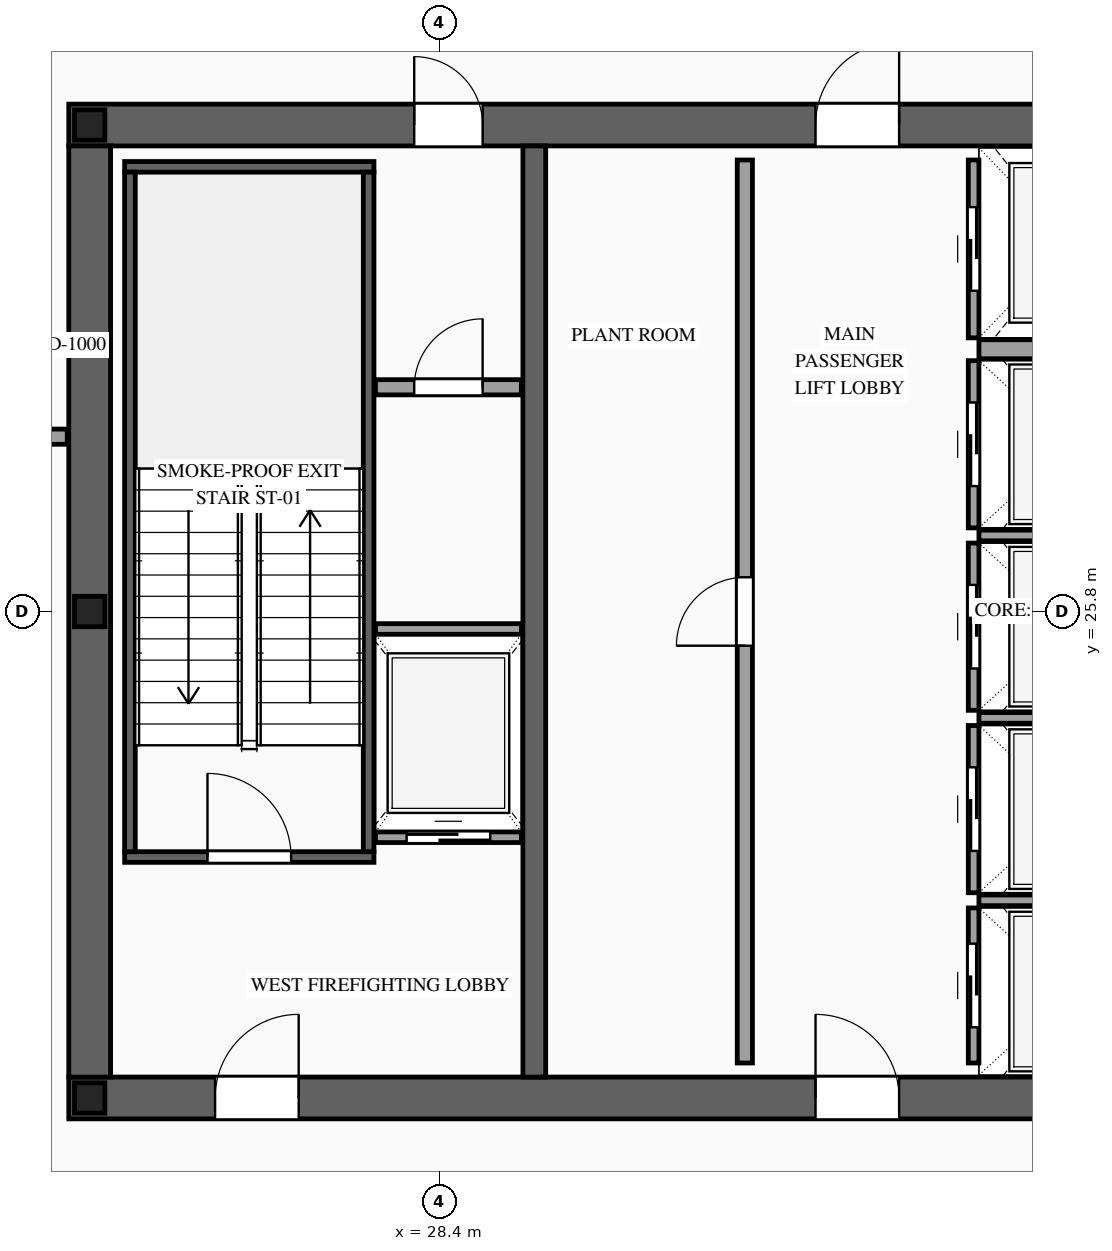
"""IFC4 building model, lengths in metres.
Left out: names, types, materials, properties, quantities, classifications, styles, units other than length and angle.
Written with IfcOpenShell. Run it as: python <this file> out.ifc"""

import sys

from ifc_helpers import new_model, si_unit, direction, frame, frame_2d, origin, origin_2d, place, context, subcontext, project, spatial, rectangle, i_section, extrude, source, transform, mapped, element, fill, save


model = new_model("IFC4")
c1 = context("Model", 3, precision=1e-05, world=origin(), true_north=direction((0.0, 1.0)))
c2 = subcontext(c1, "Body", "Model", "MODEL_VIEW")
j1 = project(units=[si_unit("LENGTHUNIT", "METRE"), si_unit("PLANEANGLEUNIT", "RADIAN")], contexts=[c1])
p1 = place(None, origin())
s1 = spatial("IfcSite", under=j1, at=p1, CompositionType="ELEMENT")
p2 = place(p1, origin())
s2 = spatial("IfcBuilding", under=s1, at=p2, CompositionType="ELEMENT")
p3 = place(p2, frame((0.0, 0.0, 219.5)))
s3 = spatial("IfcBuildingStorey", under=s2, at=p3, CompositionType="ELEMENT", Elevation=219.5)
p4 = place(p3, frame((23.525, 19.4, 0.0), z_axis=(0.0, 0.0, 1.0), x_axis=(1.0, 0.0, 0.0)))
e1 = element("IfcWall", 1, at=p4, inside=s3, PredefinedType="SHEAR", context=c2, shape_type="SweptSolid", body=[
    extrude(rectangle(XDim=26.95, YDim=0.55, at=frame_2d((13.475, 0.0))), origin(), (0.0, 0.0, 1.0), 4.6),
])
p5 = place(p4, frame((1.925, 0.0, 0.0)))
e2 = element("IfcOpeningElement", 2, at=p5, cuts=e1, PredefinedType="OPENING", context=c2, shape_type="SweptSolid", body=[
    extrude(rectangle(XDim=1.1, YDim=2.2, at=frame_2d((0.55, 1.1))), frame((0.0, 0.29, 0.0), z_axis=(0.0, -1.0, 0.0), x_axis=(1.0, 0.0, 0.0)), (0.0, 0.0, 1.0), 0.58),
])
p6 = place(p4, frame((9.825, 0.0, 0.0)))
e3 = element("IfcOpeningElement", 3, at=p6, cuts=e1, PredefinedType="OPENING", context=c2, shape_type="SweptSolid", body=[
    extrude(rectangle(XDim=1.1, YDim=2.2, at=frame_2d((0.55, 1.1))), frame((0.0, 0.29, 0.0), z_axis=(0.0, -1.0, 0.0), x_axis=(1.0, 0.0, 0.0)), (0.0, 0.0, 1.0), 0.58),
])
p7 = place(p4, frame((23.025, 0.0, 0.0)))
e4 = element("IfcOpeningElement", 4, at=p7, cuts=e1, PredefinedType="OPENING", context=c2, shape_type="SweptSolid", body=[
    extrude(rectangle(XDim=1.1, YDim=2.2, at=frame_2d((0.55, 1.1))), frame((0.0, 0.29, 0.0), z_axis=(0.0, -1.0, 0.0), x_axis=(1.0, 0.0, 0.0)), (0.0, 0.0, 1.0), 0.58),
])
p8 = place(p4, frame((19.645, 0.0, 0.0)))
e5 = element("IfcOpeningElement", 5, at=p8, cuts=e1, PredefinedType="OPENING", context=c2, shape_type="SweptSolid", body=[
    extrude(rectangle(XDim=0.9, YDim=2.15, at=frame_2d((0.45, 1.075))), frame((0.0, 0.29, 0.0), z_axis=(0.0, -1.0, 0.0), x_axis=(1.0, 0.0, 0.0)), (0.0, 0.0, 1.0), 0.58),
])
p9 = place(p3, frame((23.525, 32.2, 0.0), z_axis=(0.0, 0.0, 1.0), x_axis=(1.0, 0.0, 0.0)))
e6 = element("IfcWall", 6, at=p9, inside=s3, PredefinedType="SHEAR", context=c2, shape_type="SweptSolid", body=[
    extrude(rectangle(XDim=26.95, YDim=0.55, at=frame_2d((13.475, 0.0))), origin(), (0.0, 0.0, 1.0), 4.6),
])
p10 = place(p9, frame((4.545, 0.0, 0.0)))
e7 = element("IfcOpeningElement", 7, at=p10, cuts=e6, PredefinedType="OPENING", context=c2, shape_type="SweptSolid", body=[
    extrude(rectangle(XDim=0.9, YDim=2.15, at=frame_2d((0.45, 1.075))), frame((0.0, 0.29, 0.0), z_axis=(0.0, -1.0, 0.0), x_axis=(1.0, 0.0, 0.0)), (0.0, 0.0, 1.0), 0.58),
])
p11 = place(p9, frame((9.825, 0.0, 0.0)))
e8 = element("IfcOpeningElement", 8, at=p11, cuts=e6, PredefinedType="OPENING", context=c2, shape_type="SweptSolid", body=[
    extrude(rectangle(XDim=1.1, YDim=2.2, at=frame_2d((0.55, 1.1))), frame((0.0, 0.29, 0.0), z_axis=(0.0, -1.0, 0.0), x_axis=(1.0, 0.0, 0.0)), (0.0, 0.0, 1.0), 0.58),
])
p12 = place(p9, frame((15.675, 0.0, 0.0)))
e9 = element("IfcOpeningElement", 9, at=p12, cuts=e6, PredefinedType="OPENING", context=c2, shape_type="SweptSolid", body=[
    extrude(rectangle(XDim=1.1, YDim=2.2, at=frame_2d((0.55, 1.1))), frame((0.0, 0.29, 0.0), z_axis=(0.0, -1.0, 0.0), x_axis=(1.0, 0.0, 0.0)), (0.0, 0.0, 1.0), 0.58),
])
p13 = place(p9, frame((18.875, 0.0, 0.0)))
e10 = element("IfcOpeningElement", 10, at=p13, cuts=e6, PredefinedType="OPENING", context=c2, shape_type="SweptSolid", body=[
    extrude(rectangle(XDim=0.9, YDim=2.15, at=frame_2d((0.45, 1.075))), frame((0.0, 0.29, 0.0), z_axis=(0.0, -1.0, 0.0), x_axis=(1.0, 0.0, 0.0)), (0.0, 0.0, 1.0), 0.58),
])
m1 = source(origin(), c2, "Body", "SweptSolid", [
    extrude(rectangle(XDim=12.25, YDim=0.55, at=frame_2d((6.125, 0.0))), origin(), (0.0, 0.0, 1.0), 4.6),
])
p14 = place(p3, frame((23.8, 19.675, 0.0), z_axis=(0.0, 0.0, 1.0), x_axis=(0.0, 1.0, 0.0)))
e11 = element("IfcWall", 11, at=p14, inside=s3, PredefinedType="SHEAR", context=c2, shape_type="MappedRepresentation", body=[
    mapped(m1, transform((0.0, 0.0, 0.0), scale=1.0)),
])
m2 = source(origin(), c2, "Body", "SweptSolid", [
    extrude(rectangle(XDim=12.25, YDim=0.3, at=frame_2d((6.125, 0.0))), origin(), (0.0, 0.0, 1.0), 4.6),
])
p15 = place(p3, frame((29.65, 19.675, 0.0), z_axis=(0.0, 0.0, 1.0), x_axis=(0.0, 1.0, 0.0)))
e12 = element("IfcWall", 12, at=p15, inside=s3, PredefinedType="SOLIDWALL", context=c2, shape_type="MappedRepresentation", body=[
    mapped(m2, transform((0.0, 0.0, 0.0), scale=1.0)),
])
m3 = source(origin(), c2, "Body", "SweptSolid", [
    extrude(i_section(OverallWidth=0.4, OverallDepth=0.4, WebThickness=0.013, FlangeThickness=0.021, at=origin_2d()), origin(), (0.0, 0.0, 1.0), 4.6),
])
for number, where, z_axis, x_axis in (
    (13, (23.8, 19.4, 0.0), (0.0, 0.0, 1.0), (1.0, 0.0, 0.0)),
    (14, (23.8, 25.8, 0.0), (0.0, 0.0, 1.0), (1.0, 0.0, 0.0)),
    (15, (23.8, 32.2, 0.0), (0.0, 0.0, 1.0), (1.0, 0.0, 0.0)),
):
    element("IfcColumn", number, at=place(p3, frame(where, z_axis=z_axis, x_axis=x_axis)), inside=s3, PredefinedType="COLUMN", context=c2, shape_type="MappedRepresentation", body=[
        mapped(m3, transform((0.0, 0.0, 0.0), scale=1.0)),
    ])
p16 = place(p3, frame((27.56, 22.83, 0.0), z_axis=(0.0, 0.0, 1.0), x_axis=(1.0, 0.0, 0.0)))
e16 = element("IfcWall", 16, at=p16, inside=s3, PredefinedType="SOLIDWALL", context=c2, shape_type="SweptSolid", body=[
    extrude(rectangle(XDim=1.92, YDim=0.14, at=frame_2d((0.96, 0.0))), origin(), (0.0, 0.0, 1.0), 4.38),
])
p17 = place(p16, frame((0.41, 0.0, 0.0)))
e17 = element("IfcOpeningElement", 17, at=p17, cuts=e16, PredefinedType="OPENING", context=c2, shape_type="SweptSolid", body=[
    extrude(rectangle(XDim=1.1, YDim=2.2, at=frame_2d((0.55, 1.1))), frame((0.0, 0.085, 0.0), z_axis=(0.0, -1.0, 0.0), x_axis=(1.0, 0.0, 0.0)), (0.0, 0.0, 1.0), 0.17),
])
m4 = source(origin(), c2, "Body", "SweptSolid", [
    extrude(rectangle(XDim=1.92, YDim=0.14, at=frame_2d((0.96, 0.0))), origin(), (0.0, 0.0, 1.0), 4.38),
])
p18 = place(p3, frame((27.56, 25.57, 0.0), z_axis=(0.0, 0.0, 1.0), x_axis=(1.0, 0.0, 0.0)))
e18 = element("IfcWall", 18, at=p18, inside=s3, PredefinedType="SOLIDWALL", context=c2, shape_type="MappedRepresentation", body=[
    mapped(m4, transform((0.0, 0.0, 0.0), scale=1.0)),
])
p19 = place(p3, frame((35.43, 19.86, 0.0), z_axis=(0.0, 0.0, 1.0), x_axis=(0.0, 1.0, 0.0)))
e19 = element("IfcWall", 19, at=p19, inside=s3, PredefinedType="SOLIDWALL", context=c2, shape_type="SweptSolid", body=[
    extrude(rectangle(XDim=2.04, YDim=0.14, at=frame_2d((1.02, 0.0))), origin(), (0.0, 0.0, 1.0), 4.38),
])
p20 = place(p19, frame((0.47, 0.0, 0.0)))
e20 = element("IfcOpeningElement", 20, at=p20, cuts=e19, PredefinedType="OPENING", context=c2, shape_type="SweptSolid", body=[
    extrude(rectangle(XDim=1.1, YDim=2.2, at=frame_2d((0.55, 1.1))), frame((0.0, 0.085, 0.0), z_axis=(0.0, -1.0, 0.0), x_axis=(1.0, 0.0, 0.0)), (0.0, 0.0, 1.0), 0.17),
])
m5 = source(origin(), c2, "Body", "SweptSolid", [
    extrude(rectangle(XDim=2.4, YDim=0.14, at=frame_2d((1.2, 0.0))), origin(), (0.0, 0.0, 1.0), 4.38),
])
p21 = place(p3, frame((35.5, 22.0, 0.0), z_axis=(0.0, 0.0, 1.0), x_axis=(1.0, 0.0, 0.0)))
e21 = element("IfcWall", 21, at=p21, inside=s3, PredefinedType="SOLIDWALL", context=c2, shape_type="MappedRepresentation", body=[
    mapped(m5, transform((0.0, 0.0, 0.0), scale=1.0)),
])
p22 = place(p3, frame((35.43, 22.1, 0.0), z_axis=(0.0, 0.0, 1.0), x_axis=(0.0, 1.0, 0.0)))
e22 = element("IfcWall", 22, at=p22, inside=s3, PredefinedType="SOLIDWALL", context=c2, shape_type="SweptSolid", body=[
    extrude(rectangle(XDim=2.2, YDim=0.14, at=frame_2d((1.1, 0.0))), origin(), (0.0, 0.0, 1.0), 4.38),
])
p23 = place(p22, frame((0.55, 0.0, 0.0)))
e23 = element("IfcOpeningElement", 23, at=p23, cuts=e22, PredefinedType="OPENING", context=c2, shape_type="SweptSolid", body=[
    extrude(rectangle(XDim=1.1, YDim=2.2, at=frame_2d((0.55, 1.1))), frame((0.0, 0.085, 0.0), z_axis=(0.0, -1.0, 0.0), x_axis=(1.0, 0.0, 0.0)), (0.0, 0.0, 1.0), 0.17),
])
p24 = place(p3, frame((35.5, 24.4, 0.0), z_axis=(0.0, 0.0, 1.0), x_axis=(1.0, 0.0, 0.0)))
e24 = element("IfcWall", 24, at=p24, inside=s3, PredefinedType="SOLIDWALL", context=c2, shape_type="MappedRepresentation", body=[
    mapped(m5, transform((0.0, 0.0, 0.0), scale=1.0)),
])
p25 = place(p3, frame((35.43, 24.5, 0.0), z_axis=(0.0, 0.0, 1.0), x_axis=(0.0, 1.0, 0.0)))
e25 = element("IfcWall", 25, at=p25, inside=s3, PredefinedType="SOLIDWALL", context=c2, shape_type="SweptSolid", body=[
    extrude(rectangle(XDim=2.2, YDim=0.14, at=frame_2d((1.1, 0.0))), origin(), (0.0, 0.0, 1.0), 4.38),
])
p26 = place(p25, frame((0.55, 0.0, 0.0)))
e26 = element("IfcOpeningElement", 26, at=p26, cuts=e25, PredefinedType="OPENING", context=c2, shape_type="SweptSolid", body=[
    extrude(rectangle(XDim=1.1, YDim=2.2, at=frame_2d((0.55, 1.1))), frame((0.0, 0.085, 0.0), z_axis=(0.0, -1.0, 0.0), x_axis=(1.0, 0.0, 0.0)), (0.0, 0.0, 1.0), 0.17),
])
p27 = place(p3, frame((35.5, 26.8, 0.0), z_axis=(0.0, 0.0, 1.0), x_axis=(1.0, 0.0, 0.0)))
e27 = element("IfcWall", 27, at=p27, inside=s3, PredefinedType="SOLIDWALL", context=c2, shape_type="MappedRepresentation", body=[
    mapped(m5, transform((0.0, 0.0, 0.0), scale=1.0)),
])
p28 = place(p3, frame((35.43, 26.9, 0.0), z_axis=(0.0, 0.0, 1.0), x_axis=(0.0, 1.0, 0.0)))
e28 = element("IfcWall", 28, at=p28, inside=s3, PredefinedType="SOLIDWALL", context=c2, shape_type="SweptSolid", body=[
    extrude(rectangle(XDim=2.2, YDim=0.14, at=frame_2d((1.1, 0.0))), origin(), (0.0, 0.0, 1.0), 4.38),
])
p29 = place(p28, frame((0.55, 0.0, 0.0)))
e29 = element("IfcOpeningElement", 29, at=p29, cuts=e28, PredefinedType="OPENING", context=c2, shape_type="SweptSolid", body=[
    extrude(rectangle(XDim=1.1, YDim=2.2, at=frame_2d((0.55, 1.1))), frame((0.0, 0.085, 0.0), z_axis=(0.0, -1.0, 0.0), x_axis=(1.0, 0.0, 0.0)), (0.0, 0.0, 1.0), 0.17),
])
p30 = place(p3, frame((35.43, 29.4, 0.0), z_axis=(0.0, 0.0, 1.0), x_axis=(0.0, 1.0, 0.0)))
e30 = element("IfcWall", 30, at=p30, inside=s3, PredefinedType="SOLIDWALL", context=c2, shape_type="SweptSolid", body=[
    extrude(rectangle(XDim=2.34, YDim=0.14, at=frame_2d((1.17, 0.0))), origin(), (0.0, 0.0, 1.0), 4.38),
])
p31 = place(p30, frame((0.62, 0.0, 0.0)))
e31 = element("IfcOpeningElement", 31, at=p31, cuts=e30, PredefinedType="OPENING", context=c2, shape_type="SweptSolid", body=[
    extrude(rectangle(XDim=1.1, YDim=2.2, at=frame_2d((0.55, 1.1))), frame((0.0, 0.085, 0.0), z_axis=(0.0, -1.0, 0.0), x_axis=(1.0, 0.0, 0.0)), (0.0, 0.0, 1.0), 0.17),
])
m6 = source(origin(), c2, "Body", "SweptSolid", [
    extrude(rectangle(XDim=2.4, YDim=0.25, at=frame_2d((1.2, 0.0))), origin(), (0.0, 0.0, 1.0), 4.38),
])
p32 = place(p3, frame((35.5, 29.25, 0.0), z_axis=(0.0, 0.0, 1.0), x_axis=(1.0, 0.0, 0.0)))
e32 = element("IfcWall", 32, at=p32, inside=s3, PredefinedType="SOLIDWALL", context=c2, shape_type="MappedRepresentation", body=[
    mapped(m6, transform((0.0, 0.0, 0.0), scale=1.0)),
])
p33 = place(p3, frame((24.26, 22.57, 0.0), z_axis=(0.0, 0.0, 1.0), x_axis=(1.0, 0.0, 0.0)))
e33 = element("IfcWall", 33, at=p33, inside=s3, PredefinedType="SOLIDWALL", context=c2, shape_type="SweptSolid", body=[
    extrude(rectangle(XDim=3.28, YDim=0.14, at=frame_2d((1.64, 0.0))), origin(), (0.0, 0.0, 1.0), 4.38),
])
p34 = place(p33, frame((1.09, 0.0, 0.0)))
e34 = element("IfcOpeningElement", 34, at=p34, cuts=e33, PredefinedType="OPENING", context=c2, shape_type="SweptSolid", body=[
    extrude(rectangle(XDim=1.1, YDim=2.2, at=frame_2d((0.55, 1.1))), frame((0.0, 0.085, 0.0), z_axis=(0.0, -1.0, 0.0), x_axis=(1.0, 0.0, 0.0)), (0.0, 0.0, 1.0), 0.17),
])
m7 = source(origin(), c2, "Body", "SweptSolid", [
    extrude(rectangle(XDim=3.28, YDim=0.14, at=frame_2d((1.64, 0.0))), origin(), (0.0, 0.0, 1.0), 4.38),
])
p35 = place(p3, frame((24.26, 31.65, 0.0), z_axis=(0.0, 0.0, 1.0), x_axis=(1.0, 0.0, 0.0)))
e35 = element("IfcWall", 35, at=p35, inside=s3, PredefinedType="SOLIDWALL", context=c2, shape_type="MappedRepresentation", body=[
    mapped(m7, transform((0.0, 0.0, 0.0), scale=1.0)),
])
m8 = source(origin(), c2, "Body", "SweptSolid", [
    extrude(rectangle(XDim=8.94, YDim=0.14, at=frame_2d((4.47, 0.0))), origin(), (0.0, 0.0, 1.0), 4.38),
])
for number, where, z_axis, x_axis in (
    (36, (24.33, 22.64, 0.0), (0.0, 0.0, 1.0), (0.0, 1.0, 0.0)),
    (37, (27.47, 22.64, 0.0), (0.0, 0.0, 1.0), (0.0, 1.0, 0.0)),
):
    element("IfcWall", number, at=place(p3, frame(where, z_axis=z_axis, x_axis=x_axis)), inside=s3, PredefinedType="SOLIDWALL", context=c2, shape_type="MappedRepresentation", body=[
        mapped(m8, transform((0.0, 0.0, 0.0), scale=1.0)),
    ])
p36 = place(p3, frame((27.56, 28.75, 0.0), z_axis=(0.0, 0.0, 1.0), x_axis=(1.0, 0.0, 0.0)))
e38 = element("IfcWall", 38, at=p36, inside=s3, PredefinedType="PARTITIONING", context=c2, shape_type="SweptSolid", body=[
    extrude(rectangle(XDim=1.92, YDim=0.2, at=frame_2d((0.96, 0.0))), origin(), (0.0, 0.0, 1.0), 4.38),
])
p37 = place(p36, frame((0.51, 0.0, 0.0)))
e39 = element("IfcOpeningElement", 39, at=p37, cuts=e38, PredefinedType="OPENING", context=c2, shape_type="SweptSolid", body=[
    extrude(rectangle(XDim=0.9, YDim=2.15, at=frame_2d((0.45, 1.075))), frame((0.0, 0.115, 0.0), z_axis=(0.0, -1.0, 0.0), x_axis=(1.0, 0.0, 0.0)), (0.0, 0.0, 1.0), 0.23),
])
p38 = place(p3, frame((32.42, 19.86, 0.0), z_axis=(0.0, 0.0, 1.0), x_axis=(0.0, 1.0, 0.0)))
e40 = element("IfcWall", 40, at=p38, inside=s3, PredefinedType="PARTITIONING", context=c2, shape_type="SweptSolid", body=[
    extrude(rectangle(XDim=11.88, YDim=0.2, at=frame_2d((5.94, 0.0))), origin(), (0.0, 0.0, 1.0), 4.38),
])
p39 = place(p38, frame((5.49, 0.0, 0.0)))
e41 = element("IfcOpeningElement", 41, at=p39, cuts=e40, PredefinedType="OPENING", context=c2, shape_type="SweptSolid", body=[
    extrude(rectangle(XDim=0.9, YDim=2.15, at=frame_2d((0.45, 1.075))), frame((0.0, 0.115, 0.0), z_axis=(0.0, -1.0, 0.0), x_axis=(1.0, 0.0, 0.0)), (0.0, 0.0, 1.0), 0.23),
])
m9 = source(origin(), c2, "Body", "SweptSolid", [
    extrude(rectangle(XDim=1.555, YDim=0.2, at=frame_2d((0.777, 0.0))), origin(), (0.0, 0.0, 1.0), 4.38),
])
p40 = place(p3, frame((21.95, 28.1, 0.0), z_axis=(0.0, 0.0, 1.0), x_axis=(1.0, 0.0, 0.0)))
e42 = element("IfcWall", 42, at=p40, inside=s3, PredefinedType="PARTITIONING", context=c2, shape_type="MappedRepresentation", body=[
    mapped(m9, transform((0.0, 0.0, 0.0), scale=1.0)),
])
m10 = source(origin(), c2, "Body", "SweptSolid", [
    extrude(rectangle(XDim=1.1, YDim=2.2, at=frame_2d((0.55, 1.1))), frame((0.0, 0.025, 0.0), z_axis=(0.0, -1.0, 0.0), x_axis=(1.0, 0.0, 0.0)), (0.0, 0.0, 1.0), 0.05),
])
p41 = place(p17, origin())
e43 = element("IfcDoor", 43, at=p41, inside=s3, OperationType="SLIDING_TO_LEFT", PredefinedType="DOOR", context=c2, shape_type="MappedRepresentation", body=[
    mapped(m10, transform((0.0, 0.0, 0.0), scale=1.0)),
])
fill(e17, e43)
p42 = place(p20, origin())
e44 = element("IfcDoor", 44, at=p42, inside=s3, OperationType="SLIDING_TO_RIGHT", PredefinedType="DOOR", context=c2, shape_type="MappedRepresentation", body=[
    mapped(m10, transform((0.0, 0.0, 0.0), scale=1.0)),
])
fill(e20, e44)
p43 = place(p23, origin())
e45 = element("IfcDoor", 45, at=p43, inside=s3, OperationType="SLIDING_TO_LEFT", PredefinedType="DOOR", context=c2, shape_type="MappedRepresentation", body=[
    mapped(m10, transform((0.0, 0.0, 0.0), scale=1.0)),
])
fill(e23, e45)
p44 = place(p26, origin())
e46 = element("IfcDoor", 46, at=p44, inside=s3, OperationType="SLIDING_TO_RIGHT", PredefinedType="DOOR", context=c2, shape_type="MappedRepresentation", body=[
    mapped(m10, transform((0.0, 0.0, 0.0), scale=1.0)),
])
fill(e26, e46)
p45 = place(p29, origin())
e47 = element("IfcDoor", 47, at=p45, inside=s3, OperationType="SLIDING_TO_LEFT", PredefinedType="DOOR", context=c2, shape_type="MappedRepresentation", body=[
    mapped(m10, transform((0.0, 0.0, 0.0), scale=1.0)),
])
fill(e29, e47)
p46 = place(p31, origin())
e48 = element("IfcDoor", 48, at=p46, inside=s3, OperationType="SLIDING_TO_RIGHT", PredefinedType="DOOR", context=c2, shape_type="MappedRepresentation", body=[
    mapped(m10, transform((0.0, 0.0, 0.0), scale=1.0)),
])
fill(e31, e48)
m11 = source(origin(), c2, "Body", "SweptSolid", [
    extrude(rectangle(XDim=1.1, YDim=2.2, at=frame_2d((0.55, 1.1))), frame((0.0, 0.025, 0.0), z_axis=(0.0, -1.0, 0.0), x_axis=(1.0, 0.0, 0.0)), (0.0, 0.0, 1.0), 0.05),
])
p47 = place(p34, origin())
e49 = element("IfcDoor", 49, at=p47, inside=s3, OperationType="SINGLE_SWING_LEFT", PredefinedType="DOOR", context=c2, shape_type="MappedRepresentation", body=[
    mapped(m11, transform((0.0, 0.0, 0.0), scale=1.0)),
])
fill(e34, e49)
p48 = place(p5, origin())
e50 = element("IfcDoor", 50, at=p48, inside=s3, OperationType="SINGLE_SWING_RIGHT", PredefinedType="DOOR", context=c2, shape_type="MappedRepresentation", body=[
    mapped(m11, transform((0.0, 0.0, 0.0), scale=1.0)),
])
fill(e2, e50)
p49 = place(p6, origin())
e51 = element("IfcDoor", 51, at=p49, inside=s3, OperationType="SINGLE_SWING_LEFT", PredefinedType="DOOR", context=c2, shape_type="MappedRepresentation", body=[
    mapped(m11, transform((0.0, 0.0, 0.0), scale=1.0)),
])
fill(e3, e51)
m12 = source(origin(), c2, "Body", "SweptSolid", [
    extrude(rectangle(XDim=0.9, YDim=2.15, at=frame_2d((0.45, 1.075))), frame((0.0, 0.025, 0.0), z_axis=(0.0, -1.0, 0.0), x_axis=(1.0, 0.0, 0.0)), (0.0, 0.0, 1.0), 0.05),
])
p50 = place(p10, origin())
e52 = element("IfcDoor", 52, at=p50, inside=s3, OperationType="SINGLE_SWING_LEFT", PredefinedType="DOOR", context=c2, shape_type="MappedRepresentation", body=[
    mapped(m12, transform((0.0, 0.0, 0.0), scale=1.0)),
])
fill(e7, e52)
p51 = place(p11, origin())
e53 = element("IfcDoor", 53, at=p51, inside=s3, OperationType="SINGLE_SWING_RIGHT", PredefinedType="DOOR", context=c2, shape_type="MappedRepresentation", body=[
    mapped(m11, transform((0.0, 0.0, 0.0), scale=1.0)),
])
fill(e8, e53)
p52 = place(p37, origin())
e54 = element("IfcDoor", 54, at=p52, inside=s3, OperationType="SINGLE_SWING_RIGHT", PredefinedType="DOOR", context=c2, shape_type="MappedRepresentation", body=[
    mapped(m12, transform((0.0, 0.0, 0.0), scale=1.0)),
])
fill(e39, e54)
p53 = place(p39, origin())
e55 = element("IfcDoor", 55, at=p53, inside=s3, OperationType="SINGLE_SWING_LEFT", PredefinedType="DOOR", context=c2, shape_type="MappedRepresentation", body=[
    mapped(m12, transform((0.0, 0.0, 0.0), scale=1.0)),
])
fill(e41, e55)
save(model, sys.argv[1])
